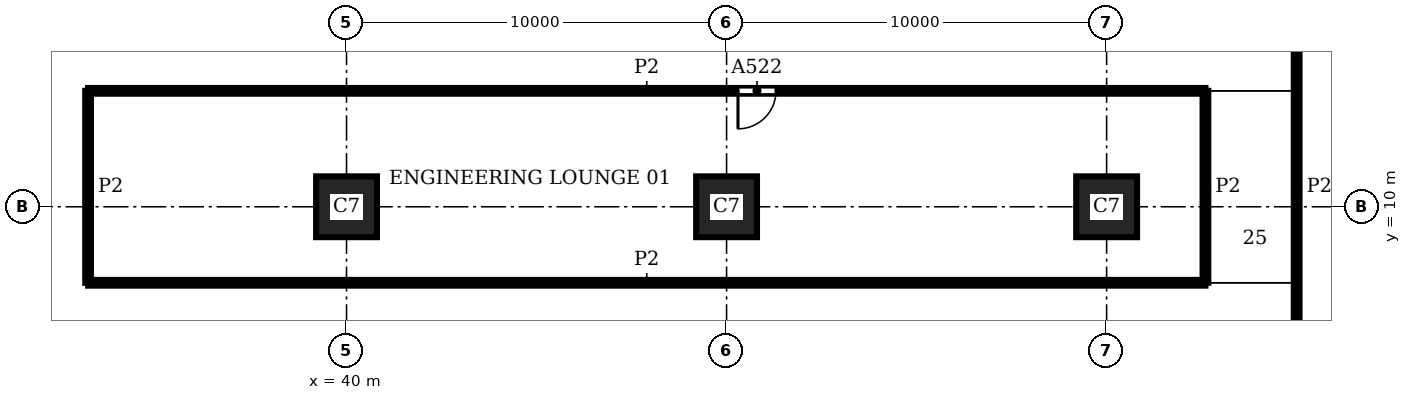
"""IFC4 building model, lengths in metres.
Left out: names, types, materials, properties, quantities, classifications, styles, units other than length and angle.
Written with IfcOpenShell. Run it as: python <this file> out.ifc"""

import sys

from ifc_helpers import new_model, si_unit, direction, frame, frame_2d, origin, origin_2d, place, context, subcontext, project, spatial, rectangle, extrude, element, fill, save


model = new_model("IFC4")
c1 = context("Model", 3, precision=1e-05, world=origin(), true_north=direction((0.0, 1.0)))
c2 = subcontext(c1, "Body", "Model", "MODEL_VIEW")
j1 = project(units=[si_unit("LENGTHUNIT", "METRE"), si_unit("PLANEANGLEUNIT", "RADIAN")], contexts=[c1])
p1 = place(None, origin())
s1 = spatial("IfcSite", under=j1, at=p1, CompositionType="ELEMENT")
p2 = place(p1, origin())
s2 = spatial("IfcBuilding", under=s1, at=p2, CompositionType="ELEMENT")
p3 = place(p2, frame((0.0, 0.0, 58.8)))
s3 = spatial("IfcBuildingStorey", under=s2, at=p3, CompositionType="ELEMENT", Elevation=58.8)
for number, where, z_axis, x_axis in (
    (1, (40.0, 10.0, 0.0), (0.0, 0.0, 1.0), (1.0, 0.0, 0.0)),
    (2, (50.0, 10.0, 0.0), (0.0, 0.0, 1.0), (1.0, 0.0, 0.0)),
    (3, (60.0, 10.0, 0.0), (0.0, 0.0, 1.0), (1.0, 0.0, 0.0)),
):
    element("IfcColumn", number, at=place(p3, frame(where, z_axis=z_axis, x_axis=x_axis)), inside=s3, PredefinedType="COLUMN", context=c2, shape_type="SweptSolid", body=[
        extrude(rectangle(XDim=1.6, YDim=1.6, at=origin_2d()), origin(), (0.0, 0.0, 1.0), 3.9),
    ])
for number, where, z_axis, x_axis in (
    (4, (33.2, 8.0, 0.0), (0.0, 0.0, 1.0), (0.0, 1.0, 0.0)),
    (5, (62.6, 8.0, 0.0), (0.0, 0.0, 1.0), (0.0, 1.0, 0.0)),
):
    element("IfcWall", number, at=place(p3, frame(where, z_axis=z_axis, x_axis=x_axis)), inside=s3, PredefinedType="PARTITIONING", context=c2, shape_type="SweptSolid", body=[
        extrude(rectangle(XDim=5.05, YDim=0.15, at=frame_2d((2.525, 0.0))), origin(), (0.0, 0.0, 1.0), 3.58),
    ])
p4 = place(p3, frame((65.0, 5.6, 0.0), z_axis=(0.0, 0.0, 1.0), x_axis=(0.0, 1.0, 0.0)))
e6 = element("IfcWall", 6, at=p4, inside=s3, PredefinedType="PARTITIONING", context=c2, shape_type="SweptSolid", body=[
    extrude(rectangle(XDim=9.85, YDim=0.15, at=frame_2d((4.925, 0.0))), origin(), (0.0, 0.0, 1.0), 3.58),
])
p5 = place(p3, frame((33.2, 8.0, 0.0), z_axis=(0.0, 0.0, 1.0), x_axis=(1.0, 0.0, 0.0)))
e7 = element("IfcWall", 7, at=p5, inside=s3, PredefinedType="PARTITIONING", context=c2, shape_type="SweptSolid", body=[
    extrude(rectangle(XDim=29.4, YDim=0.15, at=frame_2d((14.7, 0.0))), origin(), (0.0, 0.0, 1.0), 3.58),
])
p6 = place(p3, frame((33.2, 13.05, 0.0), z_axis=(0.0, 0.0, 1.0), x_axis=(1.0, 0.0, 0.0)))
e8 = element("IfcWall", 8, at=p6, inside=s3, PredefinedType="PARTITIONING", context=c2, shape_type="SweptSolid", body=[
    extrude(rectangle(XDim=29.4, YDim=0.15, at=frame_2d((14.7, 0.0))), origin(), (0.0, 0.0, 1.0), 3.58),
])
p7 = place(p6, frame((17.1, 0.0, 0.0)))
e9 = element("IfcOpeningElement", 9, at=p7, cuts=e8, PredefinedType="OPENING", context=c2, shape_type="SweptSolid", body=[
    extrude(rectangle(XDim=1.0, YDim=2.1, at=frame_2d((0.5, 1.05))), frame((0.0, 0.085, 0.0), z_axis=(0.0, -1.0, 0.0), x_axis=(1.0, 0.0, 0.0)), (0.0, 0.0, 1.0), 0.17),
])
p8 = place(p7, frame((1.0, 0.0, 0.0), z_axis=(0.0, 0.0, 1.0), x_axis=(-1.0, 0.0, 0.0)))
e10 = element("IfcDoor", 10, at=p8, inside=s3, OperationType="SINGLE_SWING_RIGHT", PredefinedType="DOOR", context=c2, shape_type="SweptSolid", body=[
    extrude(rectangle(XDim=1.0, YDim=2.1, at=frame_2d((0.5, 1.05))), frame((0.0, 0.025, 0.0), z_axis=(0.0, -1.0, 0.0), x_axis=(1.0, 0.0, 0.0)), (0.0, 0.0, 1.0), 0.05),
])
fill(e9, e10)
save(model, sys.argv[1])
